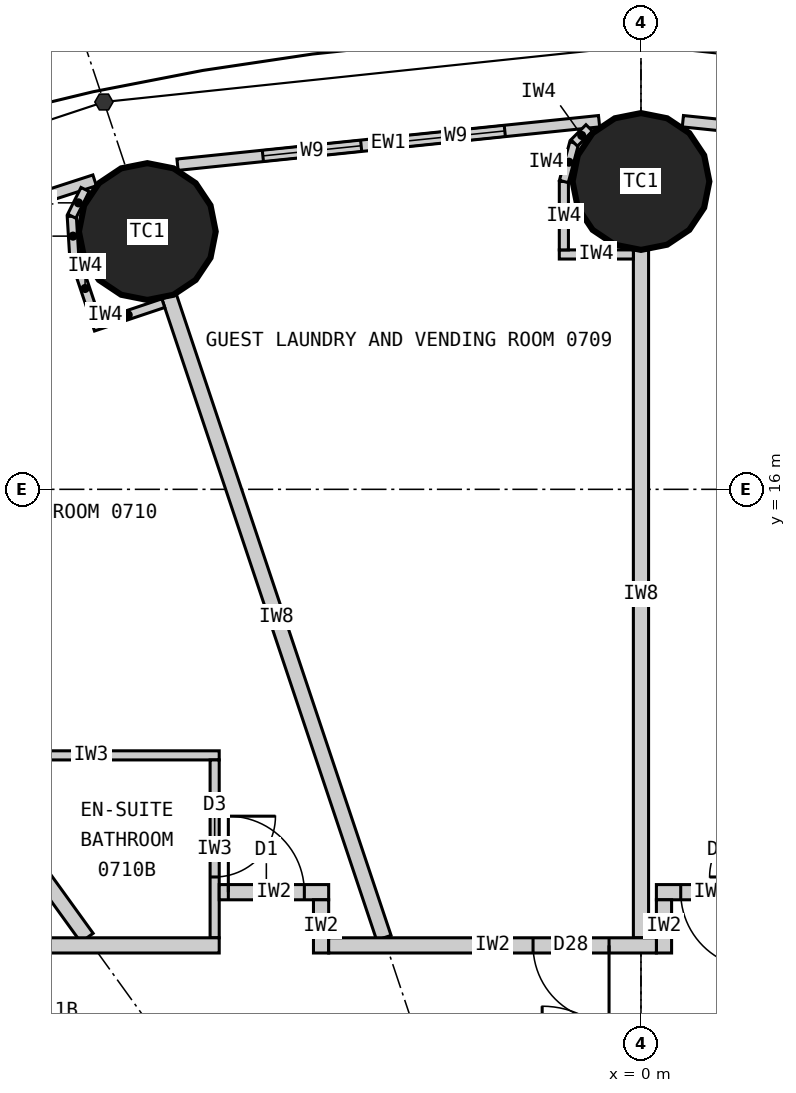
"""IFC4 building model, lengths in metres.
Left out: names, types, materials, properties, quantities, classifications, styles, units other than length and angle.
Written with IfcOpenShell. Run it as: python <this file> out.ifc"""

import sys

from ifc_helpers import new_model, si_unit, direction, frame, frame_2d, origin, origin_2d, place, context, subcontext, project, spatial, rectangle, circle, extrude, element, fill, save


model = new_model("IFC4")
c1 = context("Model", 3, precision=1e-05, world=origin(), true_north=direction((0.0, 1.0)))
c2 = subcontext(c1, "Body", "Model", "MODEL_VIEW")
j1 = project(units=[si_unit("LENGTHUNIT", "METRE"), si_unit("PLANEANGLEUNIT", "RADIAN")], contexts=[c1])
p1 = place(None, origin())
s1 = spatial("IfcSite", under=j1, at=p1, CompositionType="ELEMENT")
p2 = place(p1, origin())
s2 = spatial("IfcBuilding", under=s1, at=p2, CompositionType="ELEMENT")
p3 = place(p2, frame((0.0, 0.0, 36.0)))
s3 = spatial("IfcBuildingStorey", under=s2, at=p3, CompositionType="ELEMENT", Elevation=36.0)
for number, where, z_axis, x_axis in (
    (1, (0.0, 20.05, 0.0), (0.0, 0.0, 1.0), (1.0, 0.0, 0.0)),
    (2, (-6.495, 19.391, 0.0), (0.0, 0.0, 1.0), (1.0, 0.0, 0.0)),
):
    element("IfcColumn", number, at=place(p3, frame(where, z_axis=z_axis, x_axis=x_axis)), inside=s3, PredefinedType="COLUMN", context=c2, shape_type="SweptSolid", body=[
        extrude(circle(Radius=0.9, at=origin_2d()), origin(), (0.0, 0.0, 1.0), 3.3),
    ])
p4 = place(p3, frame((6.098, 20.271, 0.0), z_axis=(0.0, 0.0, 1.0), x_axis=(-0.994723735084, 0.102589915983, 0.0)))
e3 = element("IfcWall", 3, at=p4, inside=s3, PredefinedType="ELEMENTEDWALL", context=c2, shape_type="SweptSolid", body=[
    extrude(rectangle(XDim=5.576, YDim=0.15, at=frame_2d((2.788, 0.0))), origin(), (0.0, 0.0, 1.0), 3.12),
])
p5 = place(p4, frame((1.129, 0.0, 0.9)))
e4 = element("IfcOpeningElement", 4, at=p5, cuts=e3, PredefinedType="OPENING", context=c2, shape_type="SweptSolid", body=[
    extrude(rectangle(XDim=1.3, YDim=1.9, at=frame_2d((0.65, 0.95))), frame((0.0, 0.085, 0.0), z_axis=(0.0, -1.0, 0.0), x_axis=(1.0, 0.0, 0.0)), (0.0, 0.0, 1.0), 0.17),
])
p6 = place(p4, frame((3.029, 0.0, 0.9)))
e5 = element("IfcOpeningElement", 5, at=p6, cuts=e3, PredefinedType="OPENING", context=c2, shape_type="SweptSolid", body=[
    extrude(rectangle(XDim=1.3, YDim=1.9, at=frame_2d((0.65, 0.95))), frame((0.0, 0.085, 0.0), z_axis=(0.0, -1.0, 0.0), x_axis=(1.0, 0.0, 0.0)), (0.0, 0.0, 1.0), 0.17),
])
p7 = place(p3, frame((-0.551, 20.843, 0.0), z_axis=(0.0, 0.0, 1.0), x_axis=(-0.994723735084, -0.102589915983, 0.0)))
e6 = element("IfcWall", 6, at=p7, inside=s3, PredefinedType="ELEMENTEDWALL", context=c2, shape_type="SweptSolid", body=[
    extrude(rectangle(XDim=5.576, YDim=0.15, at=frame_2d((2.788, 0.0))), origin(), (0.0, 0.0, 1.0), 3.12),
])
p8 = place(p7, frame((1.247, 0.0, 0.9)))
e7 = element("IfcOpeningElement", 7, at=p8, cuts=e6, PredefinedType="OPENING", context=c2, shape_type="SweptSolid", body=[
    extrude(rectangle(XDim=1.3, YDim=1.9, at=frame_2d((0.65, 0.95))), frame((0.0, 0.085, 0.0), z_axis=(0.0, -1.0, 0.0), x_axis=(1.0, 0.0, 0.0)), (0.0, 0.0, 1.0), 0.17),
])
p9 = place(p7, frame((3.147, 0.0, 0.9)))
e8 = element("IfcOpeningElement", 8, at=p9, cuts=e6, PredefinedType="OPENING", context=c2, shape_type="SweptSolid", body=[
    extrude(rectangle(XDim=1.3, YDim=1.9, at=frame_2d((0.65, 0.95))), frame((0.0, 0.085, 0.0), z_axis=(0.0, -1.0, 0.0), x_axis=(1.0, 0.0, 0.0)), (0.0, 0.0, 1.0), 0.17),
])
p10 = place(p3, frame((-7.188, 20.065, 0.0), z_axis=(0.0, 0.0, 1.0), x_axis=(-0.951138486029, -0.308764603532, 0.0)))
e9 = element("IfcWall", 9, at=p10, inside=s3, PredefinedType="ELEMENTEDWALL", context=c2, shape_type="SweptSolid", body=[
    extrude(rectangle(XDim=5.444, YDim=0.15, at=frame_2d((2.722, 0.0))), origin(), (0.0, 0.0, 1.0), 3.12),
])
p11 = place(p10, frame((1.284, 0.0, 0.9)))
e10 = element("IfcOpeningElement", 10, at=p11, cuts=e9, PredefinedType="OPENING", context=c2, shape_type="SweptSolid", body=[
    extrude(rectangle(XDim=1.3, YDim=1.9, at=frame_2d((0.65, 0.95))), frame((0.0, 0.085, 0.0), z_axis=(0.0, -1.0, 0.0), x_axis=(1.0, 0.0, 0.0)), (0.0, 0.0, 1.0), 0.17),
])
p12 = place(p10, frame((3.184, 0.0, 0.9)))
e11 = element("IfcOpeningElement", 11, at=p12, cuts=e9, PredefinedType="OPENING", context=c2, shape_type="SweptSolid", body=[
    extrude(rectangle(XDim=1.3, YDim=1.9, at=frame_2d((0.65, 0.95))), frame((0.0, 0.085, 0.0), z_axis=(0.0, -1.0, 0.0), x_axis=(1.0, 0.0, 0.0)), (0.0, 0.0, 1.0), 0.17),
])
p13 = place(p3, frame((0.0, 10.1, 0.0), z_axis=(0.0, 0.0, 1.0), x_axis=(0.0, 1.0, 0.0)))
e12 = element("IfcWall", 12, at=p13, inside=s3, PredefinedType="PARTITIONING", context=c2, shape_type="SweptSolid", body=[
    extrude(rectangle(XDim=9.05, YDim=0.2, at=frame_2d((4.525, 0.0))), origin(), (0.0, 0.0, 1.0), 2.32),
])
p14 = place(p3, frame((-3.383, 10.1, 0.0), z_axis=(0.0, 0.0, 1.0), x_axis=(-0.317593727596, 0.948226884344, 0.0)))
e13 = element("IfcWall", 13, at=p14, inside=s3, PredefinedType="PARTITIONING", context=c2, shape_type="SweptSolid", body=[
    extrude(rectangle(XDim=8.899, YDim=0.2, at=frame_2d((4.449, 0.0))), origin(), (0.0, 0.0, 1.0), 2.32),
])
p15 = place(p3, frame((-7.289, 10.1, 0.0), z_axis=(0.0, 0.0, 1.0), x_axis=(-0.585216319319, 0.810877216108, 0.0)))
e14 = element("IfcWall", 14, at=p15, inside=s3, PredefinedType="PARTITIONING", context=c2, shape_type="SweptSolid", body=[
    extrude(rectangle(XDim=8.16, YDim=0.2, at=frame_2d((4.08, 0.0))), origin(), (0.0, 0.0, 1.0), 2.32),
])
p16 = place(p3, frame((-8.921, 12.5, 0.0), z_axis=(0.0, 0.0, 1.0), x_axis=(1.0, 0.0, 0.0)))
e15 = element("IfcWall", 15, at=p16, inside=s3, PredefinedType="PARTITIONING", context=c2, shape_type="SweptSolid", body=[
    extrude(rectangle(XDim=3.372, YDim=0.12, at=frame_2d((1.686, 0.0))), origin(), (0.0, 0.0, 1.0), 3.12),
])
p17 = place(p3, frame((-5.609, 10.1, 0.0), z_axis=(0.0, 0.0, 1.0), x_axis=(0.0, 1.0, 0.0)))
e16 = element("IfcWall", 16, at=p17, inside=s3, PredefinedType="PARTITIONING", context=c2, shape_type="SweptSolid", body=[
    extrude(rectangle(XDim=2.34, YDim=0.12, at=frame_2d((1.17, 0.0))), origin(), (0.0, 0.0, 1.0), 3.12),
])
p18 = place(p17, frame((0.8, 0.0, 0.0)))
e17 = element("IfcOpeningElement", 17, at=p18, cuts=e16, PredefinedType="OPENING", context=c2, shape_type="SweptSolid", body=[
    extrude(rectangle(XDim=0.8, YDim=2.1, at=frame_2d((0.4, 1.05))), frame((0.0, 0.07, 0.0), z_axis=(0.0, -1.0, 0.0), x_axis=(1.0, 0.0, 0.0)), (0.0, 0.0, 1.0), 0.14),
])
p19 = place(p3, frame((0.203, 10.7, 0.0), z_axis=(0.0, 0.0, 1.0), x_axis=(1.0, 0.0, 0.0)))
e18 = element("IfcWall", 18, at=p19, inside=s3, PredefinedType="PARTITIONING", context=c2, shape_type="SweptSolid", body=[
    extrude(rectangle(XDim=1.44, YDim=0.2, at=frame_2d((0.72, 0.0))), origin(), (0.0, 0.0, 1.0), 3.12),
])
p20 = place(p19, frame((0.32, 0.0, 0.0)))
e19 = element("IfcOpeningElement", 19, at=p20, cuts=e18, PredefinedType="OPENING", context=c2, shape_type="SweptSolid", body=[
    extrude(rectangle(XDim=1.0, YDim=2.2, at=frame_2d((0.5, 1.1))), frame((0.0, 0.11, 0.0), z_axis=(0.0, -1.0, 0.0), x_axis=(1.0, 0.0, 0.0)), (0.0, 0.0, 1.0), 0.22),
])
p21 = place(p3, frame((0.303, 9.9, 0.0), z_axis=(0.0, 0.0, 1.0), x_axis=(0.0, 1.0, 0.0)))
e20 = element("IfcWall", 20, at=p21, inside=s3, PredefinedType="PARTITIONING", context=c2, shape_type="SweptSolid", body=[
    extrude(rectangle(XDim=0.7, YDim=0.2, at=frame_2d((0.35, 0.0))), origin(), (0.0, 0.0, 1.0), 3.12),
])
p22 = place(p3, frame((-5.549, 10.7, 0.0), z_axis=(0.0, 0.0, 1.0), x_axis=(1.0, 0.0, 0.0)))
e21 = element("IfcWall", 21, at=p22, inside=s3, PredefinedType="PARTITIONING", context=c2, shape_type="SweptSolid", body=[
    extrude(rectangle(XDim=1.44, YDim=0.2, at=frame_2d((0.72, 0.0))), origin(), (0.0, 0.0, 1.0), 3.12),
])
p23 = place(p22, frame((0.12, 0.0, 0.0)))
e22 = element("IfcOpeningElement", 22, at=p23, cuts=e21, PredefinedType="OPENING", context=c2, shape_type="SweptSolid", body=[
    extrude(rectangle(XDim=1.0, YDim=2.2, at=frame_2d((0.5, 1.1))), frame((0.0, 0.11, 0.0), z_axis=(0.0, -1.0, 0.0), x_axis=(1.0, 0.0, 0.0)), (0.0, 0.0, 1.0), 0.22),
])
p24 = place(p3, frame((-4.209, 9.9, 0.0), z_axis=(0.0, 0.0, 1.0), x_axis=(0.0, 1.0, 0.0)))
e23 = element("IfcWall", 23, at=p24, inside=s3, PredefinedType="PARTITIONING", context=c2, shape_type="SweptSolid", body=[
    extrude(rectangle(XDim=0.7, YDim=0.2, at=frame_2d((0.35, 0.0))), origin(), (0.0, 0.0, 1.0), 3.12),
])
p25 = place(p3, frame((-10.179, 10.0, 0.0), z_axis=(0.0, 0.0, 1.0), x_axis=(1.0, 0.0, 0.0)))
e24 = element("IfcWall", 24, at=p25, inside=s3, PredefinedType="PARTITIONING", context=c2, shape_type="SweptSolid", body=[
    extrude(rectangle(XDim=4.63, YDim=0.2, at=frame_2d((2.315, 0.0))), origin(), (0.0, 0.0, 1.0), 3.12),
])
p26 = place(p3, frame((-4.109, 10.0, 0.0), z_axis=(0.0, 0.0, 1.0), x_axis=(1.0, 0.0, 0.0)))
e25 = element("IfcWall", 25, at=p26, inside=s3, PredefinedType="PARTITIONING", context=c2, shape_type="SweptSolid", body=[
    extrude(rectangle(XDim=4.312, YDim=0.2, at=frame_2d((2.156, 0.0))), origin(), (0.0, 0.0, 1.0), 3.12),
])
p27 = place(p26, frame((2.689, 0.0, 0.0)))
e26 = element("IfcOpeningElement", 26, at=p27, cuts=e25, PredefinedType="OPENING", context=c2, shape_type="SweptSolid", body=[
    extrude(rectangle(XDim=1.0, YDim=2.2, at=frame_2d((0.5, 1.1))), frame((0.0, 0.11, 0.0), z_axis=(0.0, -1.0, 0.0), x_axis=(1.0, 0.0, 0.0)), (0.0, 0.0, 1.0), 0.22),
])
p28 = place(p3, frame((-0.1, 19.09, 0.0), z_axis=(0.0, 0.0, 1.0), x_axis=(-1.0, 0.0, 0.0)))
e27 = element("IfcWall", 27, at=p28, inside=s3, PredefinedType="PARTITIONING", context=c2, shape_type="SweptSolid", body=[
    extrude(rectangle(XDim=0.974, YDim=0.12, at=frame_2d((0.487, 0.0))), origin(), (0.0, 0.0, 1.0), 3.12),
])
p29 = place(p3, frame((-1.015, 19.15, 0.0), z_axis=(0.0, 0.0, 1.0), x_axis=(0.0, 1.0, 0.0)))
e28 = element("IfcWall", 28, at=p29, inside=s3, PredefinedType="PARTITIONING", context=c2, shape_type="SweptSolid", body=[
    extrude(rectangle(XDim=0.9, YDim=0.12, at=frame_2d((0.45, 0.0))), origin(), (0.0, 0.0, 1.0), 3.12),
])
p30 = place(p3, frame((-1.015, 20.05, 0.0), z_axis=(0.0, 0.0, 1.0), x_axis=(0.258906465625, 0.96590239779, 0.0)))
e29 = element("IfcWall", 29, at=p30, inside=s3, PredefinedType="PARTITIONING", context=c2, shape_type="SweptSolid", body=[
    extrude(rectangle(XDim=0.525, YDim=0.12, at=frame_2d((0.263, 0.0))), origin(), (0.0, 0.0, 1.0), 3.12),
])
p31 = place(p3, frame((-0.879, 20.557, 0.0), z_axis=(0.0, 0.0, 1.0), x_axis=(0.707106781187, 0.707106781187, 0.0)))
e30 = element("IfcWall", 30, at=p31, inside=s3, PredefinedType="PARTITIONING", context=c2, shape_type="SweptSolid", body=[
    extrude(rectangle(XDim=0.279, YDim=0.12, at=frame_2d((0.14, 0.0))), origin(), (0.0, 0.0, 1.0), 3.12),
])
p32 = place(p3, frame((-6.285, 18.449, 0.0), z_axis=(0.0, 0.0, 1.0), x_axis=(-0.948281677008, -0.317430088446, 0.0)))
e31 = element("IfcWall", 31, at=p32, inside=s3, PredefinedType="PARTITIONING", context=c2, shape_type="SweptSolid", body=[
    extrude(rectangle(XDim=0.974, YDim=0.12, at=frame_2d((0.487, 0.0))), origin(), (0.0, 0.0, 1.0), 3.12),
])
p33 = place(p3, frame((-7.171, 18.216, 0.0), z_axis=(0.0, 0.0, 1.0), x_axis=(-0.317692409458, 0.94819382669, 0.0)))
e32 = element("IfcWall", 32, at=p33, inside=s3, PredefinedType="PARTITIONING", context=c2, shape_type="SweptSolid", body=[
    extrude(rectangle(XDim=0.9, YDim=0.12, at=frame_2d((0.45, 0.0))), origin(), (0.0, 0.0, 1.0), 3.12),
])
p34 = place(p3, frame((-7.457, 19.069, 0.0), z_axis=(0.0, 0.0, 1.0), x_axis=(-0.061365267648, 0.99811537606, 0.0)))
e33 = element("IfcWall", 33, at=p34, inside=s3, PredefinedType="PARTITIONING", context=c2, shape_type="SweptSolid", body=[
    extrude(rectangle(XDim=0.525, YDim=0.12, at=frame_2d((0.263, 0.0))), origin(), (0.0, 0.0, 1.0), 3.12),
])
p35 = place(p3, frame((-7.489, 19.593, 0.0), z_axis=(0.0, 0.0, 1.0), x_axis=(0.446218959337, 0.89492381817, 0.0)))
e34 = element("IfcWall", 34, at=p35, inside=s3, PredefinedType="PARTITIONING", context=c2, shape_type="SweptSolid", body=[
    extrude(rectangle(XDim=0.393, YDim=0.12, at=frame_2d((0.196, 0.0))), origin(), (0.0, 0.0, 1.0), 3.12),
])
p36 = place(p8, origin())
e35 = element("IfcWindow", 35, at=p36, inside=s3, PartitioningType="SINGLE_PANEL", PredefinedType="WINDOW", context=c2, shape_type="SweptSolid", body=[
    extrude(rectangle(XDim=1.3, YDim=1.9, at=frame_2d((0.65, 0.95))), frame((0.0, 0.03, 0.0), z_axis=(0.0, -1.0, 0.0), x_axis=(1.0, 0.0, 0.0)), (0.0, 0.0, 1.0), 0.06),
])
fill(e7, e35)
p37 = place(p9, origin())
e36 = element("IfcWindow", 36, at=p37, inside=s3, PartitioningType="SINGLE_PANEL", PredefinedType="WINDOW", context=c2, shape_type="SweptSolid", body=[
    extrude(rectangle(XDim=1.3, YDim=1.9, at=frame_2d((0.65, 0.95))), frame((0.0, 0.03, 0.0), z_axis=(0.0, -1.0, 0.0), x_axis=(1.0, 0.0, 0.0)), (0.0, 0.0, 1.0), 0.06),
])
fill(e8, e36)
p38 = place(p20, origin())
e37 = element("IfcDoor", 37, at=p38, inside=s3, OperationType="SINGLE_SWING_RIGHT", PredefinedType="DOOR", context=c2, shape_type="SweptSolid", body=[
    extrude(rectangle(XDim=1.0, YDim=2.2, at=frame_2d((0.5, 1.1))), frame((0.0, 0.025, 0.0), z_axis=(0.0, -1.0, 0.0), x_axis=(1.0, 0.0, 0.0)), (0.0, 0.0, 1.0), 0.05),
])
fill(e19, e37)
p39 = place(p27, origin())
e38 = element("IfcDoor", 38, at=p39, inside=s3, OperationType="SINGLE_SWING_RIGHT", PredefinedType="DOOR", context=c2, shape_type="SweptSolid", body=[
    extrude(rectangle(XDim=1.0, YDim=2.2, at=frame_2d((0.5, 1.1))), frame((0.0, 0.025, 0.0), z_axis=(0.0, -1.0, 0.0), x_axis=(1.0, 0.0, 0.0)), (0.0, 0.0, 1.0), 0.05),
])
fill(e26, e38)
p40 = place(p18, origin())
e39 = element("IfcDoor", 39, at=p40, inside=s3, OperationType="SINGLE_SWING_RIGHT", PredefinedType="DOOR", context=c2, shape_type="SweptSolid", body=[
    extrude(rectangle(XDim=0.8, YDim=2.1, at=frame_2d((0.4, 1.05))), frame((0.0, 0.025, 0.0), z_axis=(0.0, -1.0, 0.0), x_axis=(1.0, 0.0, 0.0)), (0.0, 0.0, 1.0), 0.05),
])
fill(e17, e39)
p41 = place(p23, origin())
e40 = element("IfcDoor", 40, at=p41, inside=s3, OperationType="SINGLE_SWING_LEFT", PredefinedType="DOOR", context=c2, shape_type="SweptSolid", body=[
    extrude(rectangle(XDim=1.0, YDim=2.2, at=frame_2d((0.5, 1.1))), frame((0.0, 0.025, 0.0), z_axis=(0.0, -1.0, 0.0), x_axis=(1.0, 0.0, 0.0)), (0.0, 0.0, 1.0), 0.05),
])
fill(e22, e40)
save(model, sys.argv[1])
